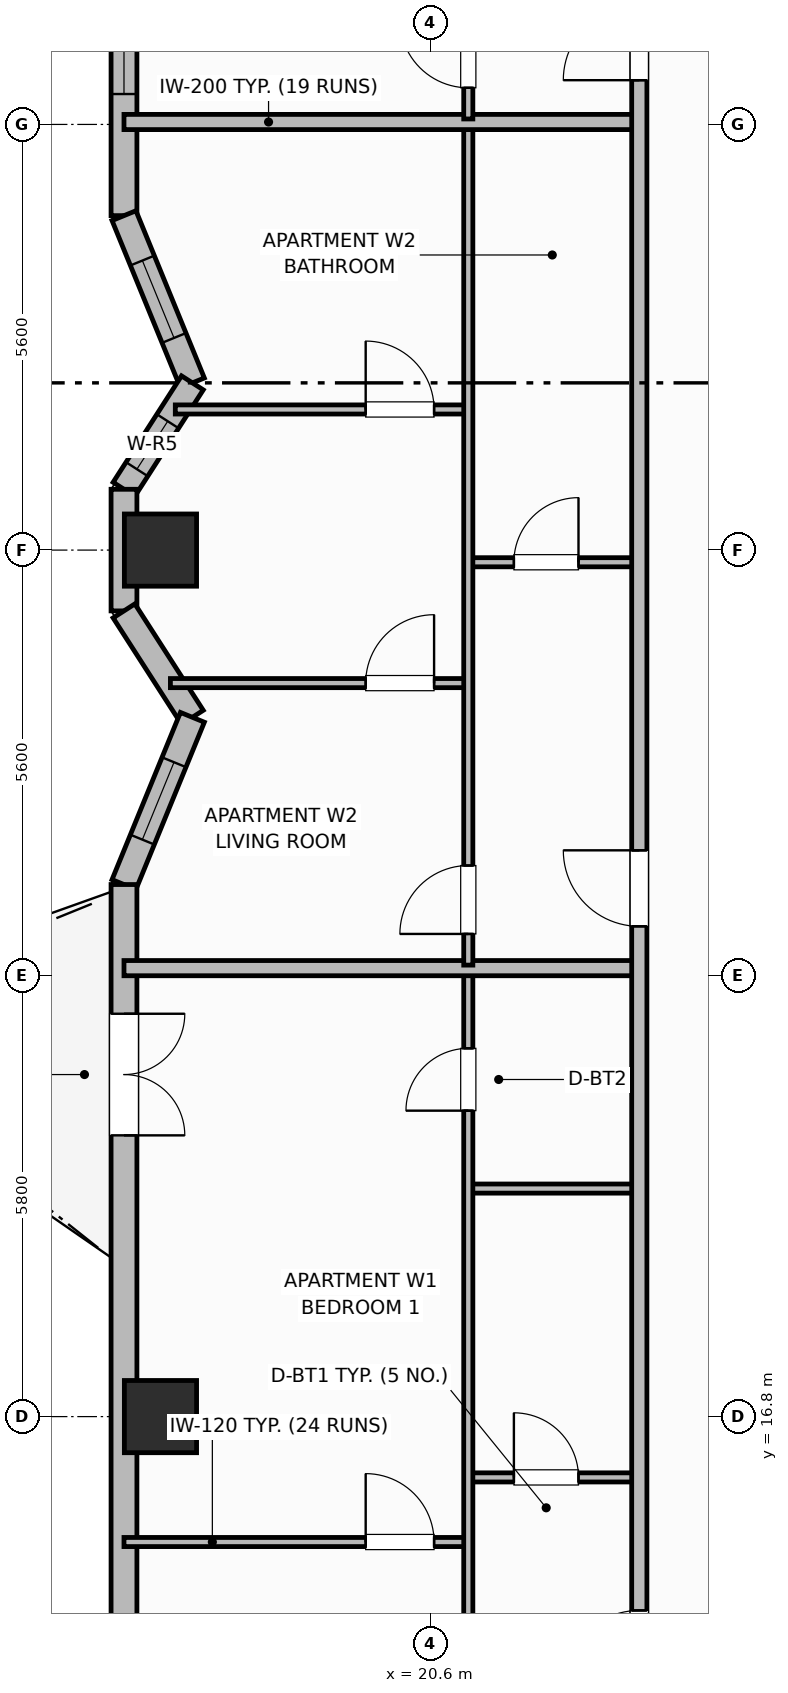
"""IFC4 building model, lengths in metres.
Left out: names, types, materials, properties, quantities, classifications, styles, units other than length and angle.
Written with IfcOpenShell. Run it as: python <this file> out.ifc"""

import sys

from ifc_helpers import new_model, si_unit, direction, frame, frame_2d, origin, origin_2d, place, context, subcontext, project, spatial, rectangle, extrude, element, fill, save


model = new_model("IFC4")
c1 = context("Model", 3, precision=1e-05, world=origin(), true_north=direction((0.0, 1.0)))
c2 = subcontext(c1, "Body", "Model", "MODEL_VIEW")
j1 = project(units=[si_unit("LENGTHUNIT", "METRE"), si_unit("PLANEANGLEUNIT", "RADIAN")], contexts=[c1])
p1 = place(None, origin())
s1 = spatial("IfcSite", under=j1, at=p1, CompositionType="ELEMENT")
p2 = place(p1, origin())
s2 = spatial("IfcBuilding", under=s1, at=p2, CompositionType="ELEMENT")
p3 = place(p2, frame((0.0, 0.0, 162.6)))
s3 = spatial("IfcBuildingStorey", under=s2, at=p3, CompositionType="ELEMENT", Elevation=162.6)
for number, where, z_axis, x_axis in (
    (1, (17.05, 16.8, 0.0), (0.0, 0.0, 1.0), (1.0, 0.0, 0.0)),
    (2, (17.05, 28.2, 0.0), (0.0, 0.0, 1.0), (1.0, 0.0, 0.0)),
):
    element("IfcColumn", number, at=place(p3, frame(where, z_axis=z_axis, x_axis=x_axis)), inside=s3, PredefinedType="COLUMN", context=c2, shape_type="SweptSolid", body=[
        extrude(rectangle(XDim=0.95, YDim=0.95, at=origin_2d()), origin(), (0.0, 0.0, 1.0), 3.7),
    ])
p4 = place(p3, frame((16.57, 45.9, 0.0), z_axis=(0.0, 0.0, 1.0), x_axis=(0.0, -1.0, 0.0)))
e3 = element("IfcWall", 3, at=p4, inside=s3, PredefinedType="SOLIDWALL", context=c2, shape_type="SweptSolid", body=[
    extrude(rectangle(XDim=13.3, YDim=0.34, at=frame_2d((6.65, 0.0))), origin(), (0.0, 0.0, 1.0), 2.72),
])
p5 = place(p4, frame((1.6, 0.0, 0.7)))
e4 = element("IfcOpeningElement", 4, at=p5, cuts=e3, PredefinedType="OPENING", context=c2, shape_type="SweptSolid", body=[
    extrude(rectangle(XDim=2.1, YDim=1.9, at=frame_2d((1.05, 0.95))), frame((0.0, 0.18, 0.0), z_axis=(0.0, -1.0, 0.0), x_axis=(1.0, 0.0, 0.0)), (0.0, 0.0, 1.0), 0.36),
])
p6 = place(p4, frame((4.36, 0.0, 0.71)))
e5 = element("IfcOpeningElement", 5, at=p6, cuts=e3, PredefinedType="OPENING", context=c2, shape_type="SweptSolid", body=[
    extrude(rectangle(XDim=1.4, YDim=1.85, at=frame_2d((0.7, 0.925))), frame((0.0, 0.18, 0.0), z_axis=(0.0, -1.0, 0.0), x_axis=(1.0, 0.0, 0.0)), (0.0, 0.0, 1.0), 0.36),
])
p7 = place(p4, frame((9.6, 0.0, 0.7)))
e6 = element("IfcOpeningElement", 6, at=p7, cuts=e3, PredefinedType="OPENING", context=c2, shape_type="SweptSolid", body=[
    extrude(rectangle(XDim=2.1, YDim=1.9, at=frame_2d((1.05, 0.95))), frame((0.0, 0.18, 0.0), z_axis=(0.0, -1.0, 0.0), x_axis=(1.0, 0.0, 0.0)), (0.0, 0.0, 1.0), 0.36),
])
p8 = place(p3, frame((16.57, 32.6, 0.0), z_axis=(0.0, 0.0, 1.0), x_axis=(0.378568858991, -0.925573130013, 0.0)))
e7 = element("IfcWall", 7, at=p8, inside=s3, PredefinedType="SOLIDWALL", context=c2, shape_type="SweptSolid", body=[
    extrude(rectangle(XDim=2.377, YDim=0.34, at=frame_2d((1.188, 0.0))), origin(), (0.0, 0.0, 1.0), 2.72),
])
p9 = place(p8, frame((0.638, 0.0, 0.91)))
e8 = element("IfcOpeningElement", 8, at=p9, cuts=e7, PredefinedType="OPENING", context=c2, shape_type="SweptSolid", body=[
    extrude(rectangle(XDim=1.1, YDim=1.65, at=frame_2d((0.55, 0.825))), frame((0.0, 0.18, 0.0), z_axis=(0.0, -1.0, 0.0), x_axis=(1.0, 0.0, 0.0)), (0.0, 0.0, 1.0), 0.36),
])
p10 = place(p3, frame((17.47, 30.4, 0.0), z_axis=(0.0, 0.0, 1.0), x_axis=(-0.540742762169, -0.841188008214, 0.0)))
e9 = element("IfcWall", 9, at=p10, inside=s3, PredefinedType="SOLIDWALL", context=c2, shape_type="SweptSolid", body=[
    extrude(rectangle(XDim=1.664, YDim=0.34, at=frame_2d((0.832, 0.0))), origin(), (0.0, 0.0, 1.0), 2.72),
])
p11 = place(p10, frame((0.6, 0.0, 0.91)))
e10 = element("IfcOpeningElement", 10, at=p11, cuts=e9, PredefinedType="OPENING", context=c2, shape_type="SweptSolid", body=[
    extrude(rectangle(XDim=0.75, YDim=1.65, at=frame_2d((0.375, 0.825))), frame((0.0, 0.18, 0.0), z_axis=(0.0, -1.0, 0.0), x_axis=(1.0, 0.0, 0.0)), (0.0, 0.0, 1.0), 0.36),
])
p12 = place(p3, frame((16.57, 29.0, 0.0), z_axis=(0.0, 0.0, 1.0), x_axis=(0.0, -1.0, 0.0)))
e11 = element("IfcWall", 11, at=p12, inside=s3, PredefinedType="SOLIDWALL", context=c2, shape_type="SweptSolid", body=[
    extrude(rectangle(XDim=1.6, YDim=0.34, at=frame_2d((0.8, 0.0))), origin(), (0.0, 0.0, 1.0), 2.72),
])
p13 = place(p3, frame((16.57, 27.4, 0.0), z_axis=(0.0, 0.0, 1.0), x_axis=(0.540742762169, -0.841188008214, 0.0)))
e12 = element("IfcWall", 12, at=p13, inside=s3, PredefinedType="SOLIDWALL", context=c2, shape_type="SweptSolid", body=[
    extrude(rectangle(XDim=1.664, YDim=0.34, at=frame_2d((0.832, 0.0))), origin(), (0.0, 0.0, 1.0), 2.72),
])
p14 = place(p3, frame((17.47, 26.0, 0.0), z_axis=(0.0, 0.0, 1.0), x_axis=(-0.378604849088, -0.925558408879, 0.0)))
e13 = element("IfcWall", 13, at=p14, inside=s3, PredefinedType="SOLIDWALL", context=c2, shape_type="SweptSolid", body=[
    extrude(rectangle(XDim=2.377, YDim=0.34, at=frame_2d((1.188, 0.0))), origin(), (0.0, 0.0, 1.0), 2.72),
])
p15 = place(p14, frame((0.638, 0.0, 0.91)))
e14 = element("IfcOpeningElement", 14, at=p15, cuts=e13, PredefinedType="OPENING", context=c2, shape_type="SweptSolid", body=[
    extrude(rectangle(XDim=1.1, YDim=1.65, at=frame_2d((0.55, 0.825))), frame((0.0, 0.18, 0.0), z_axis=(0.0, -1.0, 0.0), x_axis=(1.0, 0.0, 0.0)), (0.0, 0.0, 1.0), 0.36),
])
p16 = place(p3, frame((16.57, 23.8, 0.0), z_axis=(0.0, 0.0, 1.0), x_axis=(0.0, -1.0, 0.0)))
e15 = element("IfcWall", 15, at=p16, inside=s3, PredefinedType="SOLIDWALL", context=c2, shape_type="SweptSolid", body=[
    extrude(rectangle(XDim=13.3, YDim=0.34, at=frame_2d((6.65, 0.0))), origin(), (0.0, 0.0, 1.0), 2.72),
])
p17 = place(p16, frame((1.7, 0.0, 0.0)))
e16 = element("IfcOpeningElement", 16, at=p17, cuts=e15, PredefinedType="OPENING", context=c2, shape_type="SweptSolid", body=[
    extrude(rectangle(XDim=1.6, YDim=2.1, at=frame_2d((0.8, 1.05))), frame((0.0, 0.18, 0.0), z_axis=(0.0, -1.0, 0.0), x_axis=(1.0, 0.0, 0.0)), (0.0, 0.0, 1.0), 0.36),
])
p18 = place(p16, frame((9.75, 0.0, 0.75)))
e17 = element("IfcOpeningElement", 17, at=p18, cuts=e15, PredefinedType="OPENING", context=c2, shape_type="SweptSolid", body=[
    extrude(rectangle(XDim=1.8, YDim=1.85, at=frame_2d((0.9, 0.925))), frame((0.0, 0.18, 0.0), z_axis=(0.0, -1.0, 0.0), x_axis=(1.0, 0.0, 0.0)), (0.0, 0.0, 1.0), 0.36),
])
p19 = place(p3, frame((21.1, 16.0, 0.0), z_axis=(0.0, 0.0, 1.0), x_axis=(1.0, 0.0, 0.0)))
e18 = element("IfcWall", 18, at=p19, inside=s3, PredefinedType="PARTITIONING", context=c2, shape_type="SweptSolid", body=[
    extrude(rectangle(XDim=2.25, YDim=0.12, at=frame_2d((1.125, 0.0))), origin(), (0.0, 0.0, 1.0), 2.55),
])
p20 = place(p19, frame((0.6, 0.0, 0.0)))
e19 = element("IfcOpeningElement", 19, at=p20, cuts=e18, PredefinedType="OPENING", context=c2, shape_type="SweptSolid", body=[
    extrude(rectangle(XDim=0.85, YDim=2.1, at=frame_2d((0.425, 1.05))), frame((0.0, 0.07, 0.0), z_axis=(0.0, -1.0, 0.0), x_axis=(1.0, 0.0, 0.0)), (0.0, 0.0, 1.0), 0.14),
])
p21 = place(p3, frame((21.1, 19.8, 0.0), z_axis=(0.0, 0.0, 1.0), x_axis=(1.0, 0.0, 0.0)))
e20 = element("IfcWall", 20, at=p21, inside=s3, PredefinedType="PARTITIONING", context=c2, shape_type="SweptSolid", body=[
    extrude(rectangle(XDim=2.25, YDim=0.12, at=frame_2d((1.125, 0.0))), origin(), (0.0, 0.0, 1.0), 2.55),
])
p22 = place(p3, frame((16.57, 15.15, 0.0), z_axis=(0.0, 0.0, 1.0), x_axis=(1.0, 0.0, 0.0)))
e21 = element("IfcWall", 21, at=p22, inside=s3, PredefinedType="PARTITIONING", context=c2, shape_type="SweptSolid", body=[
    extrude(rectangle(XDim=4.53, YDim=0.12, at=frame_2d((2.265, 0.0))), origin(), (0.0, 0.0, 1.0), 2.55),
])
p23 = place(p22, frame((3.18, 0.0, 0.0)))
e22 = element("IfcOpeningElement", 22, at=p23, cuts=e21, PredefinedType="OPENING", context=c2, shape_type="SweptSolid", body=[
    extrude(rectangle(XDim=0.9, YDim=2.1, at=frame_2d((0.45, 1.05))), frame((0.0, 0.07, 0.0), z_axis=(0.0, -1.0, 0.0), x_axis=(1.0, 0.0, 0.0)), (0.0, 0.0, 1.0), 0.14),
])
p24 = place(p3, frame((21.1, 10.64, 0.0), z_axis=(0.0, 0.0, 1.0), x_axis=(0.0, 1.0, 0.0)))
e23 = element("IfcWall", 23, at=p24, inside=s3, PredefinedType="PARTITIONING", context=c2, shape_type="SweptSolid", body=[
    extrude(rectangle(XDim=12.02, YDim=0.12, at=frame_2d((6.01, 0.0))), origin(), (0.0, 0.0, 1.0), 2.55),
])
p25 = place(p24, frame((0.41, 0.0, 0.0)))
e24 = element("IfcOpeningElement", 24, at=p25, cuts=e23, PredefinedType="OPENING", context=c2, shape_type="SweptSolid", body=[
    extrude(rectangle(XDim=0.9, YDim=2.1, at=frame_2d((0.45, 1.05))), frame((0.0, 0.07, 0.0), z_axis=(0.0, -1.0, 0.0), x_axis=(1.0, 0.0, 0.0)), (0.0, 0.0, 1.0), 0.14),
])
p26 = place(p24, frame((10.185, 0.0, 0.0)))
e25 = element("IfcOpeningElement", 25, at=p26, cuts=e23, PredefinedType="OPENING", context=c2, shape_type="SweptSolid", body=[
    extrude(rectangle(XDim=0.82, YDim=2.08, at=frame_2d((0.41, 1.04))), frame((0.0, 0.07, 0.0), z_axis=(0.0, -1.0, 0.0), x_axis=(1.0, 0.0, 0.0)), (0.0, 0.0, 1.0), 0.14),
])
p27 = place(p3, frame((16.57, 22.7, 0.0), z_axis=(0.0, 0.0, 1.0), x_axis=(1.0, 0.0, 0.0)))
e26 = element("IfcWall", 26, at=p27, inside=s3, PredefinedType="PARTITIONING", context=c2, shape_type="SweptSolid", body=[
    extrude(rectangle(XDim=6.78, YDim=0.2, at=frame_2d((3.39, 0.0))), origin(), (0.0, 0.0, 1.0), 2.55),
])
p28 = place(p3, frame((21.1, 28.04, 0.0), z_axis=(0.0, 0.0, 1.0), x_axis=(1.0, 0.0, 0.0)))
e27 = element("IfcWall", 27, at=p28, inside=s3, PredefinedType="PARTITIONING", context=c2, shape_type="SweptSolid", body=[
    extrude(rectangle(XDim=2.25, YDim=0.12, at=frame_2d((1.125, 0.0))), origin(), (0.0, 0.0, 1.0), 2.55),
])
p29 = place(p28, frame((0.6, 0.0, 0.0)))
e28 = element("IfcOpeningElement", 28, at=p29, cuts=e27, PredefinedType="OPENING", context=c2, shape_type="SweptSolid", body=[
    extrude(rectangle(XDim=0.85, YDim=2.1, at=frame_2d((0.425, 1.05))), frame((0.0, 0.07, 0.0), z_axis=(0.0, -1.0, 0.0), x_axis=(1.0, 0.0, 0.0)), (0.0, 0.0, 1.0), 0.14),
])
p30 = place(p3, frame((17.181, 26.45, 0.0), z_axis=(0.0, 0.0, 1.0), x_axis=(1.0, 0.0, 0.0)))
e29 = element("IfcWall", 29, at=p30, inside=s3, PredefinedType="PARTITIONING", context=c2, shape_type="SweptSolid", body=[
    extrude(rectangle(XDim=3.919, YDim=0.12, at=frame_2d((1.96, 0.0))), origin(), (0.0, 0.0, 1.0), 2.55),
])
p31 = place(p30, frame((2.569, 0.0, 0.0)))
e30 = element("IfcOpeningElement", 30, at=p31, cuts=e29, PredefinedType="OPENING", context=c2, shape_type="SweptSolid", body=[
    extrude(rectangle(XDim=0.9, YDim=2.1, at=frame_2d((0.45, 1.05))), frame((0.0, 0.07, 0.0), z_axis=(0.0, -1.0, 0.0), x_axis=(1.0, 0.0, 0.0)), (0.0, 0.0, 1.0), 0.14),
])
p32 = place(p3, frame((17.245, 30.05, 0.0), z_axis=(0.0, 0.0, 1.0), x_axis=(1.0, 0.0, 0.0)))
e31 = element("IfcWall", 31, at=p32, inside=s3, PredefinedType="PARTITIONING", context=c2, shape_type="SweptSolid", body=[
    extrude(rectangle(XDim=3.855, YDim=0.12, at=frame_2d((1.927, 0.0))), origin(), (0.0, 0.0, 1.0), 2.55),
])
p33 = place(p32, frame((2.505, 0.0, 0.0)))
e32 = element("IfcOpeningElement", 32, at=p33, cuts=e31, PredefinedType="OPENING", context=c2, shape_type="SweptSolid", body=[
    extrude(rectangle(XDim=0.9, YDim=2.1, at=frame_2d((0.45, 1.05))), frame((0.0, 0.07, 0.0), z_axis=(0.0, -1.0, 0.0), x_axis=(1.0, 0.0, 0.0)), (0.0, 0.0, 1.0), 0.14),
])
p34 = place(p3, frame((21.1, 22.74, 0.0), z_axis=(0.0, 0.0, 1.0), x_axis=(0.0, 1.0, 0.0)))
e33 = element("IfcWall", 33, at=p34, inside=s3, PredefinedType="PARTITIONING", context=c2, shape_type="SweptSolid", body=[
    extrude(rectangle(XDim=11.052, YDim=0.12, at=frame_2d((5.526, 0.0))), origin(), (0.0, 0.0, 1.0), 2.55),
])
p35 = place(p34, frame((0.41, 0.0, 0.0)))
e34 = element("IfcOpeningElement", 34, at=p35, cuts=e33, PredefinedType="OPENING", context=c2, shape_type="SweptSolid", body=[
    extrude(rectangle(XDim=0.9, YDim=2.1, at=frame_2d((0.45, 1.05))), frame((0.0, 0.07, 0.0), z_axis=(0.0, -1.0, 0.0), x_axis=(1.0, 0.0, 0.0)), (0.0, 0.0, 1.0), 0.14),
])
p36 = place(p3, frame((16.57, 33.832, 0.0), z_axis=(0.0, 0.0, 1.0), x_axis=(1.0, 0.0, 0.0)))
e35 = element("IfcWall", 35, at=p36, inside=s3, PredefinedType="PARTITIONING", context=c2, shape_type="SweptSolid", body=[
    extrude(rectangle(XDim=6.78, YDim=0.2, at=frame_2d((3.39, 0.0))), origin(), (0.0, 0.0, 1.0), 2.55),
])
p37 = place(p3, frame((21.1, 33.872, 0.0), z_axis=(0.0, 0.0, 1.0), x_axis=(0.0, 1.0, 0.0)))
e36 = element("IfcWall", 36, at=p37, inside=s3, PredefinedType="PARTITIONING", context=c2, shape_type="SweptSolid", body=[
    extrude(rectangle(XDim=11.888, YDim=0.12, at=frame_2d((5.944, 0.0))), origin(), (0.0, 0.0, 1.0), 2.55),
])
p38 = place(p37, frame((0.41, 0.0, 0.0)))
e37 = element("IfcOpeningElement", 37, at=p38, cuts=e36, PredefinedType="OPENING", context=c2, shape_type="SweptSolid", body=[
    extrude(rectangle(XDim=0.9, YDim=2.1, at=frame_2d((0.45, 1.05))), frame((0.0, 0.07, 0.0), z_axis=(0.0, -1.0, 0.0), x_axis=(1.0, 0.0, 0.0)), (0.0, 0.0, 1.0), 0.14),
])
p39 = place(p37, frame((10.119, 0.0, 0.0)))
e38 = element("IfcOpeningElement", 38, at=p39, cuts=e36, PredefinedType="OPENING", context=c2, shape_type="SweptSolid", body=[
    extrude(rectangle(XDim=0.82, YDim=2.08, at=frame_2d((0.41, 1.04))), frame((0.0, 0.07, 0.0), z_axis=(0.0, -1.0, 0.0), x_axis=(1.0, 0.0, 0.0)), (0.0, 0.0, 1.0), 0.14),
])
p40 = place(p3, frame((23.35, 10.6, 0.0), z_axis=(0.0, 0.0, 1.0), x_axis=(0.0, 1.0, 0.0)))
e39 = element("IfcWall", 39, at=p40, inside=s3, PredefinedType="PARTITIONING", context=c2, shape_type="SweptSolid", body=[
    extrude(rectangle(XDim=35.2, YDim=0.2, at=frame_2d((17.6, 0.0))), origin(), (0.0, 0.0, 1.0), 2.55),
])
p41 = place(p40, frame((2.65, 0.0, 0.0)))
e40 = element("IfcOpeningElement", 40, at=p41, cuts=e39, PredefinedType="OPENING", context=c2, shape_type="SweptSolid", body=[
    extrude(rectangle(XDim=1.0, YDim=2.15, at=frame_2d((0.5, 1.075))), frame((0.0, 0.11, 0.0), z_axis=(0.0, -1.0, 0.0), x_axis=(1.0, 0.0, 0.0)), (0.0, 0.0, 1.0), 0.22),
])
p42 = place(p40, frame((12.65, 0.0, 0.0)))
e41 = element("IfcOpeningElement", 41, at=p42, cuts=e39, PredefinedType="OPENING", context=c2, shape_type="SweptSolid", body=[
    extrude(rectangle(XDim=1.0, YDim=2.15, at=frame_2d((0.5, 1.075))), frame((0.0, 0.11, 0.0), z_axis=(0.0, -1.0, 0.0), x_axis=(1.0, 0.0, 0.0)), (0.0, 0.0, 1.0), 0.22),
])
p43 = place(p40, frame((23.782, 0.0, 0.0)))
e42 = element("IfcOpeningElement", 42, at=p43, cuts=e39, PredefinedType="OPENING", context=c2, shape_type="SweptSolid", body=[
    extrude(rectangle(XDim=1.0, YDim=2.15, at=frame_2d((0.5, 1.075))), frame((0.0, 0.11, 0.0), z_axis=(0.0, -1.0, 0.0), x_axis=(1.0, 0.0, 0.0)), (0.0, 0.0, 1.0), 0.22),
])
p44 = place(p7, origin())
e43 = element("IfcWindow", 43, at=p44, inside=s3, PartitioningType="SINGLE_PANEL", PredefinedType="WINDOW", context=c2, shape_type="SweptSolid", body=[
    extrude(rectangle(XDim=2.1, YDim=1.9, at=frame_2d((1.05, 0.95))), frame((0.0, 0.03, 0.0), z_axis=(0.0, -1.0, 0.0), x_axis=(1.0, 0.0, 0.0)), (0.0, 0.0, 1.0), 0.06),
])
fill(e6, e43)
p45 = place(p9, origin())
e44 = element("IfcWindow", 44, at=p45, inside=s3, PartitioningType="SINGLE_PANEL", PredefinedType="WINDOW", context=c2, shape_type="SweptSolid", body=[
    extrude(rectangle(XDim=1.1, YDim=1.65, at=frame_2d((0.55, 0.825))), frame((0.0, 0.03, 0.0), z_axis=(0.0, -1.0, 0.0), x_axis=(1.0, 0.0, 0.0)), (0.0, 0.0, 1.0), 0.06),
])
fill(e8, e44)
p46 = place(p11, origin())
e45 = element("IfcWindow", 45, at=p46, inside=s3, PartitioningType="SINGLE_PANEL", PredefinedType="WINDOW", context=c2, shape_type="SweptSolid", body=[
    extrude(rectangle(XDim=0.75, YDim=1.65, at=frame_2d((0.375, 0.825))), frame((0.0, 0.03, 0.0), z_axis=(0.0, -1.0, 0.0), x_axis=(1.0, 0.0, 0.0)), (0.0, 0.0, 1.0), 0.06),
])
fill(e10, e45)
p47 = place(p15, origin())
e46 = element("IfcWindow", 46, at=p47, inside=s3, PartitioningType="SINGLE_PANEL", PredefinedType="WINDOW", context=c2, shape_type="SweptSolid", body=[
    extrude(rectangle(XDim=1.1, YDim=1.65, at=frame_2d((0.55, 0.825))), frame((0.0, 0.03, 0.0), z_axis=(0.0, -1.0, 0.0), x_axis=(1.0, 0.0, 0.0)), (0.0, 0.0, 1.0), 0.06),
])
fill(e14, e46)
p48 = place(p17, origin())
e47 = element("IfcDoor", 47, at=p48, inside=s3, OperationType="DOUBLE_DOOR_SINGLE_SWING", PredefinedType="DOOR", context=c2, shape_type="SweptSolid", body=[
    extrude(rectangle(XDim=1.6, YDim=2.1, at=frame_2d((0.8, 1.05))), frame((0.0, 0.025, 0.0), z_axis=(0.0, -1.0, 0.0), x_axis=(1.0, 0.0, 0.0)), (0.0, 0.0, 1.0), 0.05),
])
fill(e16, e47)
p49 = place(p20, origin())
e48 = element("IfcDoor", 48, at=p49, inside=s3, OperationType="SINGLE_SWING_LEFT", PredefinedType="DOOR", context=c2, shape_type="SweptSolid", body=[
    extrude(rectangle(XDim=0.85, YDim=2.1, at=frame_2d((0.425, 1.05))), frame((0.0, 0.025, 0.0), z_axis=(0.0, -1.0, 0.0), x_axis=(1.0, 0.0, 0.0)), (0.0, 0.0, 1.0), 0.05),
])
fill(e19, e48)
p50 = place(p23, origin())
e49 = element("IfcDoor", 49, at=p50, inside=s3, OperationType="SINGLE_SWING_LEFT", PredefinedType="DOOR", context=c2, shape_type="SweptSolid", body=[
    extrude(rectangle(XDim=0.9, YDim=2.1, at=frame_2d((0.45, 1.05))), frame((0.0, 0.025, 0.0), z_axis=(0.0, -1.0, 0.0), x_axis=(1.0, 0.0, 0.0)), (0.0, 0.0, 1.0), 0.05),
])
fill(e22, e49)
p51 = place(p26, origin())
e50 = element("IfcDoor", 50, at=p51, inside=s3, OperationType="SINGLE_SWING_LEFT", PredefinedType="DOOR", context=c2, shape_type="SweptSolid", body=[
    extrude(rectangle(XDim=0.82, YDim=2.08, at=frame_2d((0.41, 1.04))), frame((0.0, 0.025, 0.0), z_axis=(0.0, -1.0, 0.0), x_axis=(1.0, 0.0, 0.0)), (0.0, 0.0, 1.0), 0.05),
])
fill(e25, e50)
p52 = place(p29, origin())
e51 = element("IfcDoor", 51, at=p52, inside=s3, OperationType="SINGLE_SWING_RIGHT", PredefinedType="DOOR", context=c2, shape_type="SweptSolid", body=[
    extrude(rectangle(XDim=0.85, YDim=2.1, at=frame_2d((0.425, 1.05))), frame((0.0, 0.025, 0.0), z_axis=(0.0, -1.0, 0.0), x_axis=(1.0, 0.0, 0.0)), (0.0, 0.0, 1.0), 0.05),
])
fill(e28, e51)
p53 = place(p31, origin())
e52 = element("IfcDoor", 52, at=p53, inside=s3, OperationType="SINGLE_SWING_RIGHT", PredefinedType="DOOR", context=c2, shape_type="SweptSolid", body=[
    extrude(rectangle(XDim=0.9, YDim=2.1, at=frame_2d((0.45, 1.05))), frame((0.0, 0.025, 0.0), z_axis=(0.0, -1.0, 0.0), x_axis=(1.0, 0.0, 0.0)), (0.0, 0.0, 1.0), 0.05),
])
fill(e30, e52)
p54 = place(p33, origin())
e53 = element("IfcDoor", 53, at=p54, inside=s3, OperationType="SINGLE_SWING_LEFT", PredefinedType="DOOR", context=c2, shape_type="SweptSolid", body=[
    extrude(rectangle(XDim=0.9, YDim=2.1, at=frame_2d((0.45, 1.05))), frame((0.0, 0.025, 0.0), z_axis=(0.0, -1.0, 0.0), x_axis=(1.0, 0.0, 0.0)), (0.0, 0.0, 1.0), 0.05),
])
fill(e32, e53)
p55 = place(p35, origin())
e54 = element("IfcDoor", 54, at=p55, inside=s3, OperationType="SINGLE_SWING_LEFT", PredefinedType="DOOR", context=c2, shape_type="SweptSolid", body=[
    extrude(rectangle(XDim=0.9, YDim=2.1, at=frame_2d((0.45, 1.05))), frame((0.0, 0.025, 0.0), z_axis=(0.0, -1.0, 0.0), x_axis=(1.0, 0.0, 0.0)), (0.0, 0.0, 1.0), 0.05),
])
fill(e34, e54)
p56 = place(p38, origin())
e55 = element("IfcDoor", 55, at=p56, inside=s3, OperationType="SINGLE_SWING_RIGHT", PredefinedType="DOOR", context=c2, shape_type="SweptSolid", body=[
    extrude(rectangle(XDim=0.9, YDim=2.1, at=frame_2d((0.45, 1.05))), frame((0.0, 0.025, 0.0), z_axis=(0.0, -1.0, 0.0), x_axis=(1.0, 0.0, 0.0)), (0.0, 0.0, 1.0), 0.05),
])
fill(e37, e55)
p57 = place(p41, origin())
e56 = element("IfcDoor", 56, at=p57, inside=s3, OperationType="SINGLE_SWING_LEFT", PredefinedType="DOOR", context=c2, shape_type="SweptSolid", body=[
    extrude(rectangle(XDim=1.0, YDim=2.15, at=frame_2d((0.5, 1.075))), frame((0.0, 0.025, 0.0), z_axis=(0.0, -1.0, 0.0), x_axis=(1.0, 0.0, 0.0)), (0.0, 0.0, 1.0), 0.05),
])
fill(e40, e56)
p58 = place(p42, origin())
e57 = element("IfcDoor", 57, at=p58, inside=s3, OperationType="SINGLE_SWING_RIGHT", PredefinedType="DOOR", context=c2, shape_type="SweptSolid", body=[
    extrude(rectangle(XDim=1.0, YDim=2.15, at=frame_2d((0.5, 1.075))), frame((0.0, 0.025, 0.0), z_axis=(0.0, -1.0, 0.0), x_axis=(1.0, 0.0, 0.0)), (0.0, 0.0, 1.0), 0.05),
])
fill(e41, e57)
p59 = place(p43, origin())
e58 = element("IfcDoor", 58, at=p59, inside=s3, OperationType="SINGLE_SWING_LEFT", PredefinedType="DOOR", context=c2, shape_type="SweptSolid", body=[
    extrude(rectangle(XDim=1.0, YDim=2.15, at=frame_2d((0.5, 1.075))), frame((0.0, 0.025, 0.0), z_axis=(0.0, -1.0, 0.0), x_axis=(1.0, 0.0, 0.0)), (0.0, 0.0, 1.0), 0.05),
])
fill(e42, e58)
save(model, sys.argv[1])
